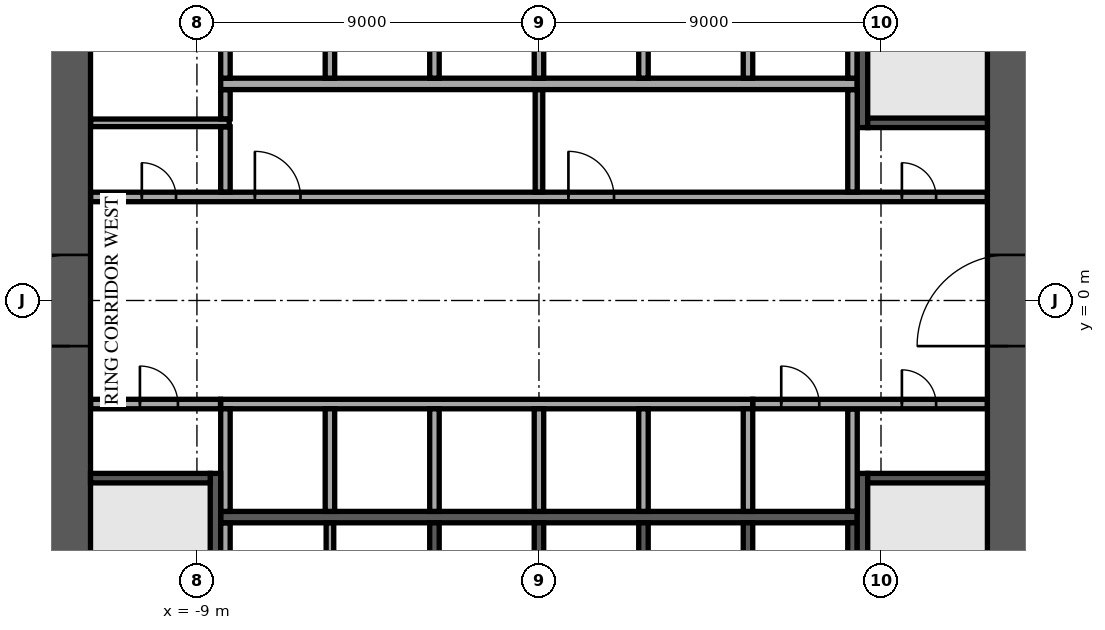
"""IFC4 building model, lengths in metres.
Left out: names, types, materials, properties, quantities, classifications, styles, units other than length and angle.
Written with IfcOpenShell. Run it as: python <this file> out.ifc"""

import sys

from ifc_helpers import new_model, si_unit, direction, frame, frame_2d, origin, place, context, subcontext, project, spatial, rectangle, extrude, element, fill, save


model = new_model("IFC4")
c1 = context("Model", 3, precision=1e-05, world=origin(), true_north=direction((0.0, 1.0)))
c2 = subcontext(c1, "Body", "Model", "MODEL_VIEW")
j1 = project(units=[si_unit("LENGTHUNIT", "METRE"), si_unit("PLANEANGLEUNIT", "RADIAN")], contexts=[c1])
p1 = place(None, origin())
s1 = spatial("IfcSite", under=j1, at=p1, CompositionType="ELEMENT")
p2 = place(p1, origin())
s2 = spatial("IfcBuilding", under=s1, at=p2, CompositionType="ELEMENT")
p3 = place(p2, frame((0.0, 0.0, 114.1)))
s3 = spatial("IfcBuildingStorey", under=s2, at=p3, CompositionType="ELEMENT", Elevation=114.1)
p4 = place(p3, frame((12.35, -11.8, 0.0), z_axis=(0.0, 0.0, 1.0), x_axis=(0.0, 1.0, 0.0)))
e1 = element("IfcWall", 1, at=p4, inside=s3, PredefinedType="SHEAR", context=c2, shape_type="SweptSolid", body=[
    extrude(rectangle(XDim=23.6, YDim=1.1, at=frame_2d((11.8, 0.0))), origin(), (0.0, 0.0, 1.0), 3.58),
])
p5 = place(p4, frame((10.6, 0.0, 0.0)))
e2 = element("IfcOpeningElement", 2, at=p5, cuts=e1, PredefinedType="OPENING", context=c2, shape_type="SweptSolid", body=[
    extrude(rectangle(XDim=2.4, YDim=2.4, at=frame_2d((1.2, 1.2))), frame((0.0, 0.56, 0.0), z_axis=(0.0, -1.0, 0.0), x_axis=(1.0, 0.0, 0.0)), (0.0, 0.0, 1.0), 1.12),
])
p6 = place(p3, frame((-12.35, -11.8, 0.0), z_axis=(0.0, 0.0, 1.0), x_axis=(0.0, 1.0, 0.0)))
e3 = element("IfcWall", 3, at=p6, inside=s3, PredefinedType="SHEAR", context=c2, shape_type="SweptSolid", body=[
    extrude(rectangle(XDim=23.6, YDim=1.1, at=frame_2d((11.8, 0.0))), origin(), (0.0, 0.0, 1.0), 3.58),
])
p7 = place(p6, frame((10.6, 0.0, 0.0)))
e4 = element("IfcOpeningElement", 4, at=p7, cuts=e3, PredefinedType="OPENING", context=c2, shape_type="SweptSolid", body=[
    extrude(rectangle(XDim=2.4, YDim=2.4, at=frame_2d((1.2, 1.2))), frame((0.0, 0.56, 0.0), z_axis=(0.0, -1.0, 0.0), x_axis=(1.0, 0.0, 0.0)), (0.0, 0.0, 1.0), 1.12),
])
for number, where, z_axis, x_axis in (
    (5, (-8.375, 5.7, 0.0), (0.0, 0.0, 1.0), (1.0, 0.0, 0.0)),
    (6, (-8.375, -5.7, 0.0), (0.0, 0.0, 1.0), (1.0, 0.0, 0.0)),
):
    element("IfcWall", number, at=place(p3, frame(where, z_axis=z_axis, x_axis=x_axis)), inside=s3, PredefinedType="SOLIDWALL", context=c2, shape_type="SweptSolid", body=[
        extrude(rectangle(XDim=16.75, YDim=0.3, at=frame_2d((8.375, 0.0))), origin(), (0.0, 0.0, 1.0), 3.58),
    ])
for number, where, z_axis, x_axis in (
    (7, (-8.25, 5.85, 0.0), (0.0, 0.0, 1.0), (0.0, 1.0, 0.0)),
    (8, (-5.5, 5.85, 0.0), (0.0, 0.0, 1.0), (0.0, 1.0, 0.0)),
    (9, (-2.75, 5.85, 0.0), (0.0, 0.0, 1.0), (0.0, 1.0, 0.0)),
    (10, (0.0, 5.85, 0.0), (0.0, 0.0, 1.0), (0.0, 1.0, 0.0)),
    (11, (2.75, 5.85, 0.0), (0.0, 0.0, 1.0), (0.0, 1.0, 0.0)),
    (12, (5.5, 5.85, 0.0), (0.0, 0.0, 1.0), (0.0, 1.0, 0.0)),
    (13, (8.25, 5.85, 0.0), (0.0, 0.0, 1.0), (0.0, 1.0, 0.0)),
):
    element("IfcWall", number, at=place(p3, frame(where, z_axis=z_axis, x_axis=x_axis)), inside=s3, PredefinedType="SOLIDWALL", context=c2, shape_type="SweptSolid", body=[
        extrude(rectangle(XDim=2.7, YDim=0.25, at=frame_2d((1.35, 0.0))), origin(), (0.0, 0.0, 1.0), 3.58),
    ])
p8 = place(p3, frame((-8.375, -2.725, 0.0), z_axis=(0.0, 0.0, 1.0), x_axis=(1.0, 0.0, 0.0)))
e14 = element("IfcWall", 14, at=p8, inside=s3, PredefinedType="SOLIDWALL", context=c2, shape_type="SweptSolid", body=[
    extrude(rectangle(XDim=14.0, YDim=0.25, at=frame_2d((7.0, 0.0))), origin(), (0.0, 0.0, 1.0), 3.58),
])
for number, where, z_axis, x_axis in (
    (15, (-8.25, -5.55, 0.0), (0.0, 0.0, 1.0), (0.0, 1.0, 0.0)),
    (16, (-5.5, -5.55, 0.0), (0.0, 0.0, 1.0), (0.0, 1.0, 0.0)),
    (17, (-2.75, -5.55, 0.0), (0.0, 0.0, 1.0), (0.0, 1.0, 0.0)),
    (18, (0.0, -5.55, 0.0), (0.0, 0.0, 1.0), (0.0, 1.0, 0.0)),
    (19, (2.75, -5.55, 0.0), (0.0, 0.0, 1.0), (0.0, 1.0, 0.0)),
    (20, (5.5, -5.55, 0.0), (0.0, 0.0, 1.0), (0.0, 1.0, 0.0)),
    (21, (-2.75, -8.55, 0.0), (0.0, 0.0, 1.0), (0.0, 1.0, 0.0)),
    (22, (0.0, -8.55, 0.0), (0.0, 0.0, 1.0), (0.0, 1.0, 0.0)),
    (23, (2.75, -8.55, 0.0), (0.0, 0.0, 1.0), (0.0, 1.0, 0.0)),
    (24, (5.5, -8.55, 0.0), (0.0, 0.0, 1.0), (0.0, 1.0, 0.0)),
    (25, (8.25, -8.55, 0.0), (0.0, 0.0, 1.0), (0.0, 1.0, 0.0)),
):
    element("IfcWall", number, at=place(p3, frame(where, z_axis=z_axis, x_axis=x_axis)), inside=s3, PredefinedType="SOLIDWALL", context=c2, shape_type="SweptSolid", body=[
        extrude(rectangle(XDim=2.7, YDim=0.25, at=frame_2d((1.35, 0.0))), origin(), (0.0, 0.0, 1.0), 3.58),
    ])
p9 = place(p3, frame((8.512, 4.55, 0.0), z_axis=(0.0, 0.0, 1.0), x_axis=(0.0, 1.0, 0.0)))
e26 = element("IfcWall", 26, at=p9, inside=s3, PredefinedType="SOLIDWALL", context=c2, shape_type="SweptSolid", body=[
    extrude(rectangle(XDim=7.25, YDim=0.275, at=frame_2d((3.625, 0.0))), origin(), (0.0, 0.0, 1.0), 3.58),
])
p10 = place(p9, frame((6.0, 0.0, 0.0)))
e27 = element("IfcOpeningElement", 27, at=p10, cuts=e26, PredefinedType="OPENING", context=c2, shape_type="SweptSolid", body=[
    extrude(rectangle(XDim=1.0, YDim=2.1, at=frame_2d((0.5, 1.05))), frame((0.0, 0.147, 0.0), z_axis=(0.0, -1.0, 0.0), x_axis=(1.0, 0.0, 0.0)), (0.0, 0.0, 1.0), 0.295),
])
p11 = place(p3, frame((8.65, 4.675, 0.0), z_axis=(0.0, 0.0, 1.0), x_axis=(1.0, 0.0, 0.0)))
e28 = element("IfcWall", 28, at=p11, inside=s3, PredefinedType="SOLIDWALL", context=c2, shape_type="SweptSolid", body=[
    extrude(rectangle(XDim=3.15, YDim=0.25, at=frame_2d((1.575, 0.0))), origin(), (0.0, 0.0, 1.0), 3.58),
])
p12 = place(p3, frame((-8.512, -4.55, 0.0), z_axis=(0.0, 0.0, 1.0), x_axis=(0.0, -1.0, 0.0)))
e29 = element("IfcWall", 29, at=p12, inside=s3, PredefinedType="SOLIDWALL", context=c2, shape_type="SweptSolid", body=[
    extrude(rectangle(XDim=7.25, YDim=0.275, at=frame_2d((3.625, 0.0))), origin(), (0.0, 0.0, 1.0), 3.58),
])
p13 = place(p12, frame((6.0, 0.0, 0.0)))
e30 = element("IfcOpeningElement", 30, at=p13, cuts=e29, PredefinedType="OPENING", context=c2, shape_type="SweptSolid", body=[
    extrude(rectangle(XDim=1.0, YDim=2.1, at=frame_2d((0.5, 1.05))), frame((0.0, 0.147, 0.0), z_axis=(0.0, -1.0, 0.0), x_axis=(1.0, 0.0, 0.0)), (0.0, 0.0, 1.0), 0.295),
])
p14 = place(p3, frame((-8.65, -4.675, 0.0), z_axis=(0.0, 0.0, 1.0), x_axis=(-1.0, 0.0, 0.0)))
e31 = element("IfcWall", 31, at=p14, inside=s3, PredefinedType="SOLIDWALL", context=c2, shape_type="SweptSolid", body=[
    extrude(rectangle(XDim=3.15, YDim=0.25, at=frame_2d((1.575, 0.0))), origin(), (0.0, 0.0, 1.0), 3.58),
])
p15 = place(p3, frame((8.512, -4.55, 0.0), z_axis=(0.0, 0.0, 1.0), x_axis=(0.0, -1.0, 0.0)))
e32 = element("IfcWall", 32, at=p15, inside=s3, PredefinedType="SOLIDWALL", context=c2, shape_type="SweptSolid", body=[
    extrude(rectangle(XDim=7.25, YDim=0.275, at=frame_2d((3.625, 0.0))), origin(), (0.0, 0.0, 1.0), 3.58),
])
p16 = place(p15, frame((6.0, 0.0, 0.0)))
e33 = element("IfcOpeningElement", 33, at=p16, cuts=e32, PredefinedType="OPENING", context=c2, shape_type="SweptSolid", body=[
    extrude(rectangle(XDim=1.0, YDim=2.1, at=frame_2d((0.5, 1.05))), frame((0.0, 0.147, 0.0), z_axis=(0.0, -1.0, 0.0), x_axis=(1.0, 0.0, 0.0)), (0.0, 0.0, 1.0), 0.295),
])
p17 = place(p3, frame((8.65, -4.675, 0.0), z_axis=(0.0, 0.0, 1.0), x_axis=(1.0, 0.0, 0.0)))
e34 = element("IfcWall", 34, at=p17, inside=s3, PredefinedType="SOLIDWALL", context=c2, shape_type="SweptSolid", body=[
    extrude(rectangle(XDim=3.15, YDim=0.25, at=frame_2d((1.575, 0.0))), origin(), (0.0, 0.0, 1.0), 3.58),
])
p18 = place(p3, frame((-8.25, -8.545, 0.0), z_axis=(0.0, 0.0, 1.0), x_axis=(0.0, 1.0, 0.0)))
e35 = element("IfcWall", 35, at=p18, inside=s3, PredefinedType="PARTITIONING", context=c2, shape_type="SweptSolid", body=[
    extrude(rectangle(XDim=2.69, YDim=0.25, at=frame_2d((1.345, 0.0))), origin(), (0.0, 0.0, 1.0), 3.58),
])
p19 = place(p3, frame((-5.5, -8.545, 0.0), z_axis=(0.0, 0.0, 1.0), x_axis=(0.0, 1.0, 0.0)))
e36 = element("IfcWall", 36, at=p19, inside=s3, PredefinedType="PARTITIONING", context=c2, shape_type="SweptSolid", body=[
    extrude(rectangle(XDim=2.69, YDim=0.2, at=frame_2d((1.345, 0.0))), origin(), (0.0, 0.0, 1.0), 3.58),
])
p20 = place(p3, frame((8.25, -5.545, 0.0), z_axis=(0.0, 0.0, 1.0), x_axis=(0.0, 1.0, 0.0)))
e37 = element("IfcWall", 37, at=p20, inside=s3, PredefinedType="PARTITIONING", context=c2, shape_type="SweptSolid", body=[
    extrude(rectangle(XDim=2.69, YDim=0.25, at=frame_2d((1.345, 0.0))), origin(), (0.0, 0.0, 1.0), 3.58),
])
p21 = place(p3, frame((-11.795, -2.725, 0.0), z_axis=(0.0, 0.0, 1.0), x_axis=(1.0, 0.0, 0.0)))
e38 = element("IfcWall", 38, at=p21, inside=s3, PredefinedType="PARTITIONING", context=c2, shape_type="SweptSolid", body=[
    extrude(rectangle(XDim=3.415, YDim=0.25, at=frame_2d((1.708, 0.0))), origin(), (0.0, 0.0, 1.0), 3.58),
])
p22 = place(p21, frame((1.295, 0.0, 0.0)))
e39 = element("IfcOpeningElement", 39, at=p22, cuts=e38, PredefinedType="OPENING", context=c2, shape_type="SweptSolid", body=[
    extrude(rectangle(XDim=1.0, YDim=2.1, at=frame_2d((0.5, 1.05))), frame((0.0, 0.135, 0.0), z_axis=(0.0, -1.0, 0.0), x_axis=(1.0, 0.0, 0.0)), (0.0, 0.0, 1.0), 0.27),
])
p23 = place(p3, frame((5.63, -2.725, 0.0), z_axis=(0.0, 0.0, 1.0), x_axis=(1.0, 0.0, 0.0)))
e40 = element("IfcWall", 40, at=p23, inside=s3, PredefinedType="PARTITIONING", context=c2, shape_type="SweptSolid", body=[
    extrude(rectangle(XDim=6.165, YDim=0.25, at=frame_2d((3.083, 0.0))), origin(), (0.0, 0.0, 1.0), 3.58),
])
p24 = place(p23, frame((0.745, 0.0, 0.0)))
e41 = element("IfcOpeningElement", 41, at=p24, cuts=e40, PredefinedType="OPENING", context=c2, shape_type="SweptSolid", body=[
    extrude(rectangle(XDim=1.0, YDim=2.1, at=frame_2d((0.5, 1.05))), frame((0.0, 0.135, 0.0), z_axis=(0.0, -1.0, 0.0), x_axis=(1.0, 0.0, 0.0)), (0.0, 0.0, 1.0), 0.27),
])
p25 = place(p23, frame((3.92, 0.0, 0.0)))
e42 = element("IfcOpeningElement", 42, at=p25, cuts=e40, PredefinedType="OPENING", context=c2, shape_type="SweptSolid", body=[
    extrude(rectangle(XDim=0.9, YDim=2.1, at=frame_2d((0.45, 1.05))), frame((0.0, 0.135, 0.0), z_axis=(0.0, -1.0, 0.0), x_axis=(1.0, 0.0, 0.0)), (0.0, 0.0, 1.0), 0.27),
])
p26 = place(p3, frame((-11.795, 2.725, 0.0), z_axis=(0.0, 0.0, 1.0), x_axis=(1.0, 0.0, 0.0)))
e43 = element("IfcWall", 43, at=p26, inside=s3, PredefinedType="PARTITIONING", context=c2, shape_type="SweptSolid", body=[
    extrude(rectangle(XDim=23.59, YDim=0.25, at=frame_2d((11.795, 0.0))), origin(), (0.0, 0.0, 1.0), 3.58),
])
p27 = place(p26, frame((21.345, 0.0, 0.0)))
e44 = element("IfcOpeningElement", 44, at=p27, cuts=e43, PredefinedType="OPENING", context=c2, shape_type="SweptSolid", body=[
    extrude(rectangle(XDim=0.9, YDim=2.1, at=frame_2d((0.45, 1.05))), frame((0.0, 0.135, 0.0), z_axis=(0.0, -1.0, 0.0), x_axis=(1.0, 0.0, 0.0)), (0.0, 0.0, 1.0), 0.27),
])
p28 = place(p26, frame((1.345, 0.0, 0.0)))
e45 = element("IfcOpeningElement", 45, at=p28, cuts=e43, PredefinedType="OPENING", context=c2, shape_type="SweptSolid", body=[
    extrude(rectangle(XDim=0.9, YDim=2.1, at=frame_2d((0.45, 1.05))), frame((0.0, 0.135, 0.0), z_axis=(0.0, -1.0, 0.0), x_axis=(1.0, 0.0, 0.0)), (0.0, 0.0, 1.0), 0.27),
])
p29 = place(p26, frame((4.32, 0.0, 0.0)))
e46 = element("IfcOpeningElement", 46, at=p29, cuts=e43, PredefinedType="OPENING", context=c2, shape_type="SweptSolid", body=[
    extrude(rectangle(XDim=1.2, YDim=2.1, at=frame_2d((0.6, 1.05))), frame((0.0, 0.135, 0.0), z_axis=(0.0, -1.0, 0.0), x_axis=(1.0, 0.0, 0.0)), (0.0, 0.0, 1.0), 0.27),
])
p30 = place(p26, frame((12.57, 0.0, 0.0)))
e47 = element("IfcOpeningElement", 47, at=p30, cuts=e43, PredefinedType="OPENING", context=c2, shape_type="SweptSolid", body=[
    extrude(rectangle(XDim=1.2, YDim=2.1, at=frame_2d((0.6, 1.05))), frame((0.0, 0.135, 0.0), z_axis=(0.0, -1.0, 0.0), x_axis=(1.0, 0.0, 0.0)), (0.0, 0.0, 1.0), 0.27),
])
p31 = place(p3, frame((-8.25, 2.855, 0.0), z_axis=(0.0, 0.0, 1.0), x_axis=(0.0, 1.0, 0.0)))
e48 = element("IfcWall", 48, at=p31, inside=s3, PredefinedType="PARTITIONING", context=c2, shape_type="SweptSolid", body=[
    extrude(rectangle(XDim=1.715, YDim=0.25, at=frame_2d((0.857, 0.0))), origin(), (0.0, 0.0, 1.0), 3.58),
])
p32 = place(p3, frame((0.0, 2.855, 0.0), z_axis=(0.0, 0.0, 1.0), x_axis=(0.0, 1.0, 0.0)))
e49 = element("IfcWall", 49, at=p32, inside=s3, PredefinedType="PARTITIONING", context=c2, shape_type="SweptSolid", body=[
    extrude(rectangle(XDim=2.69, YDim=0.2, at=frame_2d((1.345, 0.0))), origin(), (0.0, 0.0, 1.0), 3.58),
])
p33 = place(p3, frame((8.25, 2.855, 0.0), z_axis=(0.0, 0.0, 1.0), x_axis=(0.0, 1.0, 0.0)))
e50 = element("IfcWall", 50, at=p33, inside=s3, PredefinedType="PARTITIONING", context=c2, shape_type="SweptSolid", body=[
    extrude(rectangle(XDim=2.69, YDim=0.25, at=frame_2d((1.345, 0.0))), origin(), (0.0, 0.0, 1.0), 3.58),
])
p34 = place(p3, frame((-11.795, 4.675, 0.0), z_axis=(0.0, 0.0, 1.0), x_axis=(1.0, 0.0, 0.0)))
e51 = element("IfcWall", 51, at=p34, inside=s3, PredefinedType="PARTITIONING", context=c2, shape_type="SweptSolid", body=[
    extrude(rectangle(XDim=3.645, YDim=0.2, at=frame_2d((1.823, 0.0))), origin(), (0.0, 0.0, 1.0), 3.58),
])
p35 = place(p3, frame((-8.25, 4.78, 0.0), z_axis=(0.0, 0.0, 1.0), x_axis=(0.0, 1.0, 0.0)))
e52 = element("IfcWall", 52, at=p35, inside=s3, PredefinedType="PARTITIONING", context=c2, shape_type="SweptSolid", body=[
    extrude(rectangle(XDim=0.765, YDim=0.25, at=frame_2d((0.382, 0.0))), origin(), (0.0, 0.0, 1.0), 3.58),
])
p36 = place(p5, origin())
e53 = element("IfcDoor", 53, at=p36, inside=s3, OperationType="SINGLE_SWING_LEFT", PredefinedType="DOOR", context=c2, shape_type="SweptSolid", body=[
    extrude(rectangle(XDim=2.4, YDim=2.4, at=frame_2d((1.2, 1.2))), frame((0.0, 0.025, 0.0), z_axis=(0.0, -1.0, 0.0), x_axis=(1.0, 0.0, 0.0)), (0.0, 0.0, 1.0), 0.05),
])
fill(e2, e53)
p37 = place(p7, origin())
e54 = element("IfcDoor", 54, at=p37, inside=s3, OperationType="SINGLE_SWING_LEFT", PredefinedType="DOOR", context=c2, shape_type="SweptSolid", body=[
    extrude(rectangle(XDim=2.4, YDim=2.4, at=frame_2d((1.2, 1.2))), frame((0.0, 0.025, 0.0), z_axis=(0.0, -1.0, 0.0), x_axis=(1.0, 0.0, 0.0)), (0.0, 0.0, 1.0), 0.05),
])
fill(e4, e54)
p38 = place(p22, origin())
e55 = element("IfcDoor", 55, at=p38, inside=s3, OperationType="SINGLE_SWING_LEFT", PredefinedType="DOOR", context=c2, shape_type="SweptSolid", body=[
    extrude(rectangle(XDim=1.0, YDim=2.1, at=frame_2d((0.5, 1.05))), frame((0.0, 0.025, 0.0), z_axis=(0.0, -1.0, 0.0), x_axis=(1.0, 0.0, 0.0)), (0.0, 0.0, 1.0), 0.05),
])
fill(e39, e55)
p39 = place(p24, origin())
e56 = element("IfcDoor", 56, at=p39, inside=s3, OperationType="SINGLE_SWING_LEFT", PredefinedType="DOOR", context=c2, shape_type="SweptSolid", body=[
    extrude(rectangle(XDim=1.0, YDim=2.1, at=frame_2d((0.5, 1.05))), frame((0.0, 0.025, 0.0), z_axis=(0.0, -1.0, 0.0), x_axis=(1.0, 0.0, 0.0)), (0.0, 0.0, 1.0), 0.05),
])
fill(e41, e56)
p40 = place(p27, origin())
e57 = element("IfcDoor", 57, at=p40, inside=s3, OperationType="SINGLE_SWING_LEFT", PredefinedType="DOOR", context=c2, shape_type="SweptSolid", body=[
    extrude(rectangle(XDim=0.9, YDim=2.1, at=frame_2d((0.45, 1.05))), frame((0.0, 0.025, 0.0), z_axis=(0.0, -1.0, 0.0), x_axis=(1.0, 0.0, 0.0)), (0.0, 0.0, 1.0), 0.05),
])
fill(e44, e57)
p41 = place(p25, origin())
e58 = element("IfcDoor", 58, at=p41, inside=s3, OperationType="SINGLE_SWING_LEFT", PredefinedType="DOOR", context=c2, shape_type="SweptSolid", body=[
    extrude(rectangle(XDim=0.9, YDim=2.1, at=frame_2d((0.45, 1.05))), frame((0.0, 0.025, 0.0), z_axis=(0.0, -1.0, 0.0), x_axis=(1.0, 0.0, 0.0)), (0.0, 0.0, 1.0), 0.05),
])
fill(e42, e58)
p42 = place(p28, origin())
e59 = element("IfcDoor", 59, at=p42, inside=s3, OperationType="SINGLE_SWING_LEFT", PredefinedType="DOOR", context=c2, shape_type="SweptSolid", body=[
    extrude(rectangle(XDim=0.9, YDim=2.1, at=frame_2d((0.45, 1.05))), frame((0.0, 0.025, 0.0), z_axis=(0.0, -1.0, 0.0), x_axis=(1.0, 0.0, 0.0)), (0.0, 0.0, 1.0), 0.05),
])
fill(e45, e59)
p43 = place(p29, origin())
e60 = element("IfcDoor", 60, at=p43, inside=s3, OperationType="SINGLE_SWING_LEFT", PredefinedType="DOOR", context=c2, shape_type="SweptSolid", body=[
    extrude(rectangle(XDim=1.2, YDim=2.1, at=frame_2d((0.6, 1.05))), frame((0.0, 0.025, 0.0), z_axis=(0.0, -1.0, 0.0), x_axis=(1.0, 0.0, 0.0)), (0.0, 0.0, 1.0), 0.05),
])
fill(e46, e60)
p44 = place(p30, origin())
e61 = element("IfcDoor", 61, at=p44, inside=s3, OperationType="SINGLE_SWING_LEFT", PredefinedType="DOOR", context=c2, shape_type="SweptSolid", body=[
    extrude(rectangle(XDim=1.2, YDim=2.1, at=frame_2d((0.6, 1.05))), frame((0.0, 0.025, 0.0), z_axis=(0.0, -1.0, 0.0), x_axis=(1.0, 0.0, 0.0)), (0.0, 0.0, 1.0), 0.05),
])
fill(e47, e61)
save(model, sys.argv[1])
